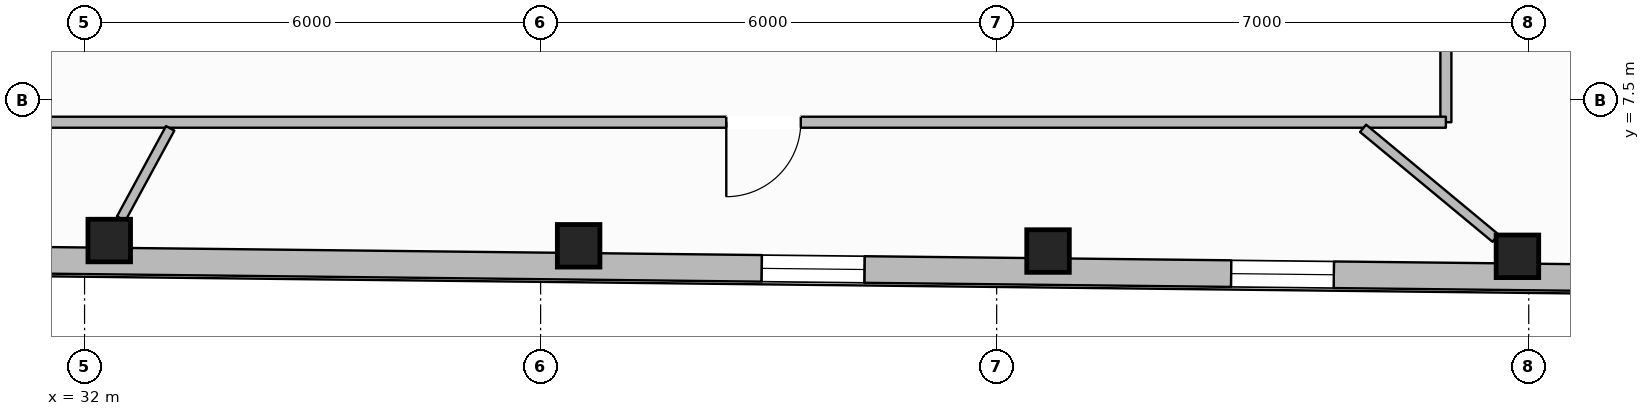
"""IFC4 building model, lengths in metres.
Left out: names, types, materials, properties, quantities, classifications, styles, units other than length and angle.
Written with IfcOpenShell. Run it as: python <this file> out.ifc"""

import sys

from ifc_helpers import new_model, si_unit, direction, frame, frame_2d, origin, origin_2d, place, context, subcontext, project, spatial, rectangle, hollow_rectangle, extrude, element, fill, save


model = new_model("IFC4")
c1 = context("Model", 3, precision=1e-05, world=origin(), true_north=direction((0.0, 1.0)))
c2 = subcontext(c1, "Body", "Model", "MODEL_VIEW")
j1 = project(units=[si_unit("LENGTHUNIT", "METRE"), si_unit("PLANEANGLEUNIT", "RADIAN")], contexts=[c1])
p1 = place(None, origin())
s1 = spatial("IfcSite", under=j1, at=p1, CompositionType="ELEMENT")
p2 = place(p1, origin())
s2 = spatial("IfcBuilding", under=s1, at=p2, CompositionType="ELEMENT")
p3 = place(p2, frame((0.0, 0.0, 258.75)))
s3 = spatial("IfcBuildingStorey", under=s2, at=p3, CompositionType="ELEMENT", Elevation=258.75)
for number, where, z_axis, x_axis in (
    (1, (32.325, 5.654, 0.0), (0.0, 0.0, 1.0), (1.0, 0.0, 0.0)),
    (2, (38.5, 5.584, 0.0), (0.0, 0.0, 1.0), (1.0, 0.0, 0.0)),
    (3, (44.676, 5.515, 0.0), (0.0, 0.0, 1.0), (1.0, 0.0, 0.0)),
    (4, (50.851, 5.446, 0.0), (0.0, 0.0, 1.0), (1.0, 0.0, 0.0)),
):
    element("IfcColumn", number, at=place(p3, frame(where, z_axis=z_axis, x_axis=x_axis)), inside=s3, PredefinedType="COLUMN", context=c2, shape_type="SweptSolid", body=[
        extrude(hollow_rectangle(XDim=0.56, YDim=0.56, WallThickness=0.025, at=origin_2d()), origin(), (0.0, 0.0, 1.0), 3.61),
    ])
p4 = place(p3, frame((57.506, 5.102, 0.0), z_axis=(0.0, 0.0, 1.0), x_axis=(-0.999937327785, 0.011195557226, 0.0)))
e5 = element("IfcWall", 5, at=p4, inside=s3, PredefinedType="STANDARD", context=c2, shape_type="SweptSolid", body=[
    extrude(rectangle(XDim=38.01, YDim=0.35, at=frame_2d((19.005, 0.0))), origin(), (0.0, 0.0, 1.0), 3.196),
])
p5 = place(p4, frame((33.775, 0.0, 0.65)))
e6 = element("IfcOpeningElement", 6, at=p5, cuts=e5, PredefinedType="OPENING", context=c2, shape_type="SweptSolid", body=[
    extrude(rectangle(XDim=1.35, YDim=1.75, at=frame_2d((0.675, 0.875))), frame((0.0, 0.185, 0.0), z_axis=(0.0, -1.0, 0.0), x_axis=(1.0, 0.0, 0.0)), (0.0, 0.0, 1.0), 0.37),
])
p6 = place(p4, frame((27.599, 0.0, 0.65)))
e7 = element("IfcOpeningElement", 7, at=p6, cuts=e5, PredefinedType="OPENING", context=c2, shape_type="SweptSolid", body=[
    extrude(rectangle(XDim=1.35, YDim=1.75, at=frame_2d((0.675, 0.875))), frame((0.0, 0.185, 0.0), z_axis=(0.0, -1.0, 0.0), x_axis=(1.0, 0.0, 0.0)), (0.0, 0.0, 1.0), 0.37),
])
p7 = place(p4, frame((15.247, 0.0, 0.65)))
e8 = element("IfcOpeningElement", 8, at=p7, cuts=e5, PredefinedType="OPENING", context=c2, shape_type="SweptSolid", body=[
    extrude(rectangle(XDim=1.35, YDim=1.75, at=frame_2d((0.675, 0.875))), frame((0.0, 0.185, 0.0), z_axis=(0.0, -1.0, 0.0), x_axis=(1.0, 0.0, 0.0)), (0.0, 0.0, 1.0), 0.37),
])
p8 = place(p4, frame((9.071, 0.0, 0.65)))
e9 = element("IfcOpeningElement", 9, at=p8, cuts=e5, PredefinedType="OPENING", context=c2, shape_type="SweptSolid", body=[
    extrude(rectangle(XDim=1.35, YDim=1.75, at=frame_2d((0.675, 0.875))), frame((0.0, 0.185, 0.0), z_axis=(0.0, -1.0, 0.0), x_axis=(1.0, 0.0, 0.0)), (0.0, 0.0, 1.0), 0.37),
])
p9 = place(p4, frame((2.896, 0.0, 0.65)))
e10 = element("IfcOpeningElement", 10, at=p9, cuts=e5, PredefinedType="OPENING", context=c2, shape_type="SweptSolid", body=[
    extrude(rectangle(XDim=1.35, YDim=1.75, at=frame_2d((0.675, 0.875))), frame((0.0, 0.185, 0.0), z_axis=(0.0, -1.0, 0.0), x_axis=(1.0, 0.0, 0.0)), (0.0, 0.0, 1.0), 0.37),
])
p10 = place(p3, frame((49.91, 12.15, 0.0), z_axis=(0.0, 0.0, 1.0), x_axis=(0.0, -1.0, 0.0)))
e11 = element("IfcWall", 11, at=p10, inside=s3, PredefinedType="PARTITIONING", context=c2, shape_type="SweptSolid", body=[
    extrude(rectangle(XDim=4.94, YDim=0.145, at=frame_2d((2.47, 0.0))), origin(), (0.0, 0.0, 1.0), 3.61),
])
p11 = place(p10, frame((1.77, 0.0, 0.0)))
e12 = element("IfcOpeningElement", 12, at=p11, cuts=e11, PredefinedType="OPENING", context=c2, shape_type="SweptSolid", body=[
    extrude(rectangle(XDim=1.4, YDim=2.2, at=frame_2d((0.7, 1.1))), frame((0.0, 0.083, 0.0), z_axis=(0.0, -1.0, 0.0), x_axis=(1.0, 0.0, 0.0)), (0.0, 0.0, 1.0), 0.165),
])
p12 = place(p3, frame((49.91, 7.21, 0.0), z_axis=(0.0, 0.0, 1.0), x_axis=(-1.0, 0.0, 0.0)))
e13 = element("IfcWall", 13, at=p12, inside=s3, PredefinedType="PARTITIONING", context=c2, shape_type="SweptSolid", body=[
    extrude(rectangle(XDim=23.82, YDim=0.145, at=frame_2d((11.91, 0.0))), origin(), (0.0, 0.0, 1.0), 3.61),
])
p13 = place(p12, frame((19.928, 0.0, 0.0)))
e14 = element("IfcOpeningElement", 14, at=p13, cuts=e13, PredefinedType="OPENING", context=c2, shape_type="SweptSolid", body=[
    extrude(rectangle(XDim=0.98, YDim=2.15, at=frame_2d((0.49, 1.075))), frame((0.0, 0.083, 0.0), z_axis=(0.0, -1.0, 0.0), x_axis=(1.0, 0.0, 0.0)), (0.0, 0.0, 1.0), 0.165),
])
p14 = place(p12, frame((8.487, 0.0, 0.0)))
e15 = element("IfcOpeningElement", 15, at=p14, cuts=e13, PredefinedType="OPENING", context=c2, shape_type="SweptSolid", body=[
    extrude(rectangle(XDim=0.98, YDim=2.15, at=frame_2d((0.49, 1.075))), frame((0.0, 0.083, 0.0), z_axis=(0.0, -1.0, 0.0), x_axis=(1.0, 0.0, 0.0)), (0.0, 0.0, 1.0), 0.165),
])
p15 = place(p3, frame((33.127, 7.129, 0.0), z_axis=(0.0, 0.0, 1.0), x_axis=(-0.47743452788, -0.878667327029, 0.0)))
e16 = element("IfcWall", 16, at=p15, inside=s3, PredefinedType="PARTITIONING", context=c2, shape_type="SweptSolid", body=[
    extrude(rectangle(XDim=1.352, YDim=0.125, at=frame_2d((0.676, 0.0))), origin(), (0.0, 0.0, 1.0), 3.61),
])
p16 = place(p3, frame((48.821, 7.129, 0.0), z_axis=(0.0, 0.0, 1.0), x_axis=(0.769836810093, -0.63824077418, 0.0)))
e17 = element("IfcWall", 17, at=p16, inside=s3, PredefinedType="PARTITIONING", context=c2, shape_type="SweptSolid", body=[
    extrude(rectangle(XDim=2.263, YDim=0.125, at=frame_2d((1.132, 0.0))), origin(), (0.0, 0.0, 1.0), 3.246),
])
p17 = place(p7, origin())
e18 = element("IfcWindow", 18, at=p17, inside=s3, PartitioningType="SINGLE_PANEL", PredefinedType="WINDOW", context=c2, shape_type="SweptSolid", body=[
    extrude(rectangle(XDim=1.35, YDim=1.75, at=frame_2d((0.675, 0.875))), frame((0.0, 0.03, 0.0), z_axis=(0.0, -1.0, 0.0), x_axis=(1.0, 0.0, 0.0)), (0.0, 0.0, 1.0), 0.06),
])
fill(e8, e18)
p18 = place(p8, origin())
e19 = element("IfcWindow", 19, at=p18, inside=s3, PartitioningType="SINGLE_PANEL", PredefinedType="WINDOW", context=c2, shape_type="SweptSolid", body=[
    extrude(rectangle(XDim=1.35, YDim=1.75, at=frame_2d((0.675, 0.875))), frame((0.0, 0.03, 0.0), z_axis=(0.0, -1.0, 0.0), x_axis=(1.0, 0.0, 0.0)), (0.0, 0.0, 1.0), 0.06),
])
fill(e9, e19)
p19 = place(p14, origin())
e20 = element("IfcDoor", 20, at=p19, inside=s3, OperationType="SINGLE_SWING_RIGHT", PredefinedType="DOOR", context=c2, shape_type="SweptSolid", body=[
    extrude(rectangle(XDim=0.98, YDim=2.15, at=frame_2d((0.49, 1.075))), frame((0.0, 0.025, 0.0), z_axis=(0.0, -1.0, 0.0), x_axis=(1.0, 0.0, 0.0)), (0.0, 0.0, 1.0), 0.05),
])
fill(e15, e20)
save(model, sys.argv[1])
